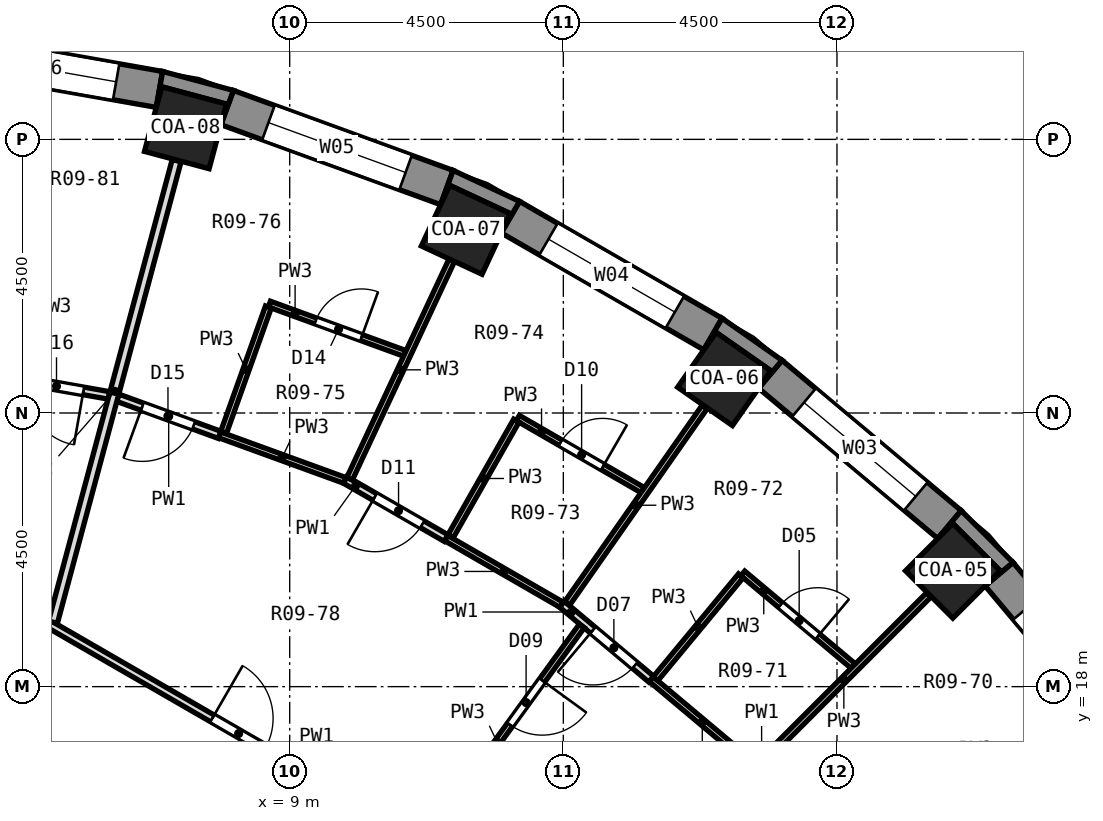
"""IFC4 building model, lengths in metres.
Left out: names, types, materials, properties, quantities, classifications, styles, units other than length and angle.
Written with IfcOpenShell. Run it as: python <this file> out.ifc"""

import sys

from ifc_helpers import new_model, si_unit, direction, frame, frame_2d, origin, origin_2d, place, context, subcontext, project, spatial, polyline, rectangle, outline, extrude, element, fill, save


model = new_model("IFC4")
c1 = context("Model", 3, precision=1e-05, world=origin(), true_north=direction((0.0, 1.0)))
c2 = subcontext(c1, "Body", "Model", "MODEL_VIEW")
j1 = project(units=[si_unit("LENGTHUNIT", "METRE"), si_unit("PLANEANGLEUNIT", "RADIAN")], contexts=[c1])
p1 = place(None, origin())
s1 = spatial("IfcSite", under=j1, at=p1, CompositionType="ELEMENT")
p2 = place(p1, origin())
s2 = spatial("IfcBuilding", under=s1, at=p2, CompositionType="ELEMENT")
p3 = place(p2, frame((0.0, 0.0, 26.3)))
s3 = spatial("IfcBuildingStorey", under=s2, at=p3, CompositionType="ELEMENT", Elevation=26.3)
p4 = place(p3, frame((19.905, 19.905, 0.0), z_axis=(0.0, 0.0, 1.0), x_axis=(0.707106781187, 0.707106781187, 0.0)))
e1 = element("IfcColumn", 1, at=p4, inside=s3, PredefinedType="COLUMN", context=c2, shape_type="SweptSolid", body=[
    extrude(rectangle(XDim=1.1, YDim=1.1, at=origin_2d()), origin(), (0.0, 0.0, 1.0), 3.3),
])
p5 = place(p3, frame((16.146, 23.059, -0.55), z_axis=(0.0, 0.0, 1.0), x_axis=(0.573576436351, 0.819152044289, 0.0)))
e2 = element("IfcColumn", 2, at=p5, inside=s3, PredefinedType="COLUMN", context=c2, shape_type="SweptSolid", body=[
    extrude(rectangle(XDim=1.1, YDim=1.1, at=origin_2d()), origin(), (0.0, 0.0, 1.0), 3.85),
])
p6 = place(p3, frame((11.897, 25.512, 0.0), z_axis=(0.0, 0.0, 1.0), x_axis=(0.422618261741, 0.906307787037, 0.0)))
e3 = element("IfcColumn", 3, at=p6, inside=s3, PredefinedType="COLUMN", context=c2, shape_type="SweptSolid", body=[
    extrude(rectangle(XDim=1.1, YDim=1.1, at=origin_2d()), origin(), (0.0, 0.0, 1.0), 3.3),
])
p7 = place(p3, frame((7.286, 27.191, -1.05), z_axis=(0.0, 0.0, 1.0), x_axis=(0.258819045103, 0.965925826289, 0.0)))
e4 = element("IfcColumn", 4, at=p7, inside=s3, PredefinedType="COLUMN", context=c2, shape_type="SweptSolid", body=[
    extrude(rectangle(XDim=1.1, YDim=1.1, at=origin_2d()), origin(), (0.0, 0.0, 1.0), 4.35),
])
p8 = place(p3, frame((23.137, 16.904, 0.0), z_axis=(0.0, 0.0, 1.0), x_axis=(-0.642809392687, 0.766026164483, 0.0)))
e5 = element("IfcWall", 5, at=p8, inside=s3, PredefinedType="SOLIDWALL", context=c2, shape_type="SweptSolid", body=[
    extrude(rectangle(XDim=3.846, YDim=0.6, at=frame_2d((1.923, 0.0))), origin(), (0.0, 0.0, 1.0), 2.75),
])
p9 = place(p8, frame((0.723, 0.0, 0.9)))
e6 = element("IfcOpeningElement", 6, at=p9, cuts=e5, PredefinedType="OPENING", context=c2, shape_type="SweptSolid", body=[
    extrude(rectangle(XDim=2.4, YDim=1.8, at=frame_2d((1.2, 0.9))), frame((0.0, 0.312, 0.0), z_axis=(0.0, -1.0, 0.0), x_axis=(1.0, 0.0, 0.0)), (0.0, 0.0, 1.0), 0.624),
])
p10 = place(p3, frame((19.85, 20.665, 0.0), z_axis=(0.0, 0.0, 1.0), x_axis=(-0.766026164483, 0.642809392687, 0.0)))
e7 = element("IfcWall", 7, at=p10, inside=s3, PredefinedType="SOLIDWALL", context=c2, shape_type="SweptSolid", body=[
    extrude(rectangle(XDim=3.846, YDim=0.6, at=frame_2d((1.923, 0.0))), origin(), (0.0, 0.0, 1.0), 2.75),
])
p11 = place(p10, frame((0.723, 0.0, 0.9)))
e8 = element("IfcOpeningElement", 8, at=p11, cuts=e7, PredefinedType="OPENING", context=c2, shape_type="SweptSolid", body=[
    extrude(rectangle(XDim=2.4, YDim=1.8, at=frame_2d((1.2, 0.9))), frame((0.0, 0.312, 0.0), z_axis=(0.0, -1.0, 0.0), x_axis=(1.0, 0.0, 0.0)), (0.0, 0.0, 1.0), 0.624),
])
p12 = place(p3, frame((15.96, 23.798, 0.0), z_axis=(0.0, 0.0, 1.0), x_axis=(-0.86603124159, 0.499989888488, 0.0)))
e9 = element("IfcWall", 9, at=p12, inside=s3, PredefinedType="SOLIDWALL", context=c2, shape_type="SweptSolid", body=[
    extrude(rectangle(XDim=3.846, YDim=0.6, at=frame_2d((1.923, 0.0))), origin(), (0.0, 0.0, 1.0), 2.75),
])
p13 = place(p12, frame((0.723, 0.0, 0.9)))
e10 = element("IfcOpeningElement", 10, at=p13, cuts=e9, PredefinedType="OPENING", context=c2, shape_type="SweptSolid", body=[
    extrude(rectangle(XDim=2.4, YDim=1.8, at=frame_2d((1.2, 0.9))), frame((0.0, 0.312, 0.0), z_axis=(0.0, -1.0, 0.0), x_axis=(1.0, 0.0, 0.0)), (0.0, 0.0, 1.0), 0.624),
])
p14 = place(p3, frame((11.585, 26.208, 0.0), z_axis=(0.0, 0.0, 1.0), x_axis=(-0.939689588564, 0.342028474173, 0.0)))
e11 = element("IfcWall", 11, at=p14, inside=s3, PredefinedType="SOLIDWALL", context=c2, shape_type="SweptSolid", body=[
    extrude(rectangle(XDim=3.846, YDim=0.6, at=frame_2d((1.923, 0.0))), origin(), (0.0, 0.0, 1.0), 2.75),
])
p15 = place(p14, frame((0.723, 0.0, 0.9)))
e12 = element("IfcOpeningElement", 12, at=p15, cuts=e11, PredefinedType="OPENING", context=c2, shape_type="SweptSolid", body=[
    extrude(rectangle(XDim=2.4, YDim=1.8, at=frame_2d((1.2, 0.9))), frame((0.0, 0.312, 0.0), z_axis=(0.0, -1.0, 0.0), x_axis=(1.0, 0.0, 0.0)), (0.0, 0.0, 1.0), 0.624),
])
p16 = place(p3, frame((6.858, 27.821, 0.0), z_axis=(0.0, 0.0, 1.0), x_axis=(-0.984800809218, 0.173687553279, 0.0)))
e13 = element("IfcWall", 13, at=p16, inside=s3, PredefinedType="SOLIDWALL", context=c2, shape_type="SweptSolid", body=[
    extrude(rectangle(XDim=3.846, YDim=0.6, at=frame_2d((1.923, 0.0))), origin(), (0.0, 0.0, 1.0), 2.75),
])
p17 = place(p16, frame((0.723, 0.0, 0.9)))
e14 = element("IfcOpeningElement", 14, at=p17, cuts=e13, PredefinedType="OPENING", context=c2, shape_type="SweptSolid", body=[
    extrude(rectangle(XDim=2.4, YDim=1.8, at=frame_2d((1.2, 0.9))), frame((0.0, 0.312, 0.0), z_axis=(0.0, -1.0, 0.0), x_axis=(1.0, 0.0, 0.0)), (0.0, 0.0, 1.0), 0.624),
])
p18 = place(p3, origin())
e15 = element("IfcWall", 15, at=p18, inside=s3, PredefinedType="SOLIDWALL", context=c2, shape_type="SweptSolid", body=[
    extrude(outline(polyline([(20.043, 20.895), (19.657, 20.435), (19.905, 20.683), (20.683, 19.905), (20.435, 19.657), (20.895, 20.043), (20.043, 20.895)])), origin(), (0.0, 0.0, 1.0), 2.75),
])
p19 = place(p3, origin())
e16 = element("IfcWall", 16, at=p19, inside=s3, PredefinedType="SOLIDWALL", context=c2, shape_type="SweptSolid", body=[
    extrude(outline(polyline([(17.097, 23.367), (16.11, 24.058), (15.81, 23.538), (16.011, 23.825), (16.912, 23.194), (16.711, 22.907), (17.097, 23.367)])), origin(), (0.0, 0.0, 1.0), 2.75),
])
p20 = place(p3, origin())
e17 = element("IfcWall", 17, at=p20, inside=s3, PredefinedType="SOLIDWALL", context=c2, shape_type="SweptSolid", body=[
    extrude(outline(polyline([(11.688, 26.49), (11.483, 25.926), (11.631, 26.243), (12.628, 25.779), (12.479, 25.461), (12.78, 25.981), (11.688, 26.49)])), origin(), (0.0, 0.0, 1.0), 2.75),
])
p21 = place(p3, origin())
e18 = element("IfcWall", 18, at=p21, inside=s3, PredefinedType="SOLIDWALL", context=c2, shape_type="SweptSolid", body=[
    extrude(outline(polyline([(6.91, 28.117), (6.806, 27.526), (6.897, 27.865), (7.959, 27.58), (7.869, 27.241), (8.074, 27.805), (6.91, 28.117)])), origin(), (0.0, 0.0, 1.0), 2.75),
])
p22 = place(p3, frame((14.946, 18.123, 0.0), z_axis=(0.0, 0.0, 1.0), x_axis=(0.765889072534, -0.642972727705, 0.0)))
e19 = element("IfcWall", 19, at=p22, inside=s3, PredefinedType="PARTITIONING", context=c2, shape_type="SweptSolid", body=[
    extrude(rectangle(XDim=2.193, YDim=0.1, at=frame_2d((1.096, 0.0))), origin(), (0.0, 0.0, 1.0), 2.75),
])
p23 = place(p3, frame((13.476, 19.356, 0.0), z_axis=(0.0, 0.0, 1.0), x_axis=(0.76614099915, -0.642672521135, 0.0)))
e20 = element("IfcWall", 20, at=p23, inside=s3, PredefinedType="PARTITIONING", context=c2, shape_type="SweptSolid", body=[
    extrude(rectangle(XDim=1.918, YDim=0.125, at=frame_2d((0.959, 0.0))), origin(), (0.0, 0.0, 1.0), 2.75),
])
p24 = place(p23, frame((0.666, 0.0, 0.0)))
e21 = element("IfcOpeningElement", 21, at=p24, cuts=e20, PredefinedType="OPENING", context=c2, shape_type="SweptSolid", body=[
    extrude(rectangle(XDim=0.9, YDim=2.1, at=frame_2d((0.45, 1.05))), frame((0.0, 0.074, 0.0), z_axis=(0.0, -1.0, 0.0), x_axis=(1.0, 0.0, 0.0)), (0.0, 0.0, 1.0), 0.149),
])
p25 = place(p3, frame((16.451, 19.862, 0.0), z_axis=(0.0, 0.0, 1.0), x_axis=(0.766132669123, -0.642682451373, 0.0)))
e22 = element("IfcWall", 22, at=p25, inside=s3, PredefinedType="PARTITIONING", context=c2, shape_type="SweptSolid", body=[
    extrude(rectangle(XDim=2.371, YDim=0.1, at=frame_2d((1.186, 0.0))), origin(), (0.0, 0.0, 1.0), 2.75),
])
p26 = place(p25, frame((0.811, 0.0, 0.0)))
e23 = element("IfcOpeningElement", 23, at=p26, cuts=e22, PredefinedType="OPENING", context=c2, shape_type="SweptSolid", body=[
    extrude(rectangle(XDim=0.8, YDim=2.1, at=frame_2d((0.4, 1.05))), frame((0.0, 0.062, 0.0), z_axis=(0.0, -1.0, 0.0), x_axis=(1.0, 0.0, 0.0)), (0.0, 0.0, 1.0), 0.124),
])
p27 = place(p3, frame((5.029, 19.036, 0.0), z_axis=(0.0, 0.0, 1.0), x_axis=(0.866024825845, -0.50000100102, 0.0)))
e24 = element("IfcWall", 24, at=p27, inside=s3, PredefinedType="PARTITIONING", context=c2, shape_type="SweptSolid", body=[
    extrude(rectangle(XDim=10.192, YDim=0.125, at=frame_2d((5.096, 0.0))), origin(), (0.0, 0.0, 1.0), 2.75),
])
p28 = place(p27, frame((3.116, 0.0, 0.0)))
e25 = element("IfcOpeningElement", 25, at=p28, cuts=e24, PredefinedType="OPENING", context=c2, shape_type="SweptSolid", body=[
    extrude(rectangle(XDim=1.0, YDim=2.1, at=frame_2d((0.5, 1.05))), frame((0.0, 0.074, 0.0), z_axis=(0.0, -1.0, 0.0), x_axis=(1.0, 0.0, 0.0)), (0.0, 0.0, 1.0), 0.149),
])
p29 = place(p3, frame((11.572, 20.443, 0.0), z_axis=(0.0, 0.0, 1.0), x_axis=(0.865939000713, -0.500149624657, 0.0)))
e26 = element("IfcWall", 26, at=p29, inside=s3, PredefinedType="PARTITIONING", context=c2, shape_type="SweptSolid", body=[
    extrude(rectangle(XDim=2.193, YDim=0.1, at=frame_2d((1.097, 0.0))), origin(), (0.0, 0.0, 1.0), 2.75),
])
p30 = place(p3, frame((9.91, 21.402, 0.0), z_axis=(0.0, 0.0, 1.0), x_axis=(0.866191941426, -0.499711437341, 0.0)))
e27 = element("IfcWall", 27, at=p30, inside=s3, PredefinedType="PARTITIONING", context=c2, shape_type="SweptSolid", body=[
    extrude(rectangle(XDim=1.919, YDim=0.125, at=frame_2d((0.959, 0.0))), origin(), (0.0, 0.0, 1.0), 2.75),
])
p31 = place(p30, frame((0.566, 0.0, 0.0)))
e28 = element("IfcOpeningElement", 28, at=p31, cuts=e27, PredefinedType="OPENING", context=c2, shape_type="SweptSolid", body=[
    extrude(rectangle(XDim=0.9, YDim=2.1, at=frame_2d((0.45, 1.05))), frame((0.0, 0.074, 0.0), z_axis=(0.0, -1.0, 0.0), x_axis=(1.0, 0.0, 0.0)), (0.0, 0.0, 1.0), 0.149),
])
p32 = place(p3, frame((12.752, 22.417, 0.0), z_axis=(0.0, 0.0, 1.0), x_axis=(0.865984969814, -0.500070027153, 0.0)))
e29 = element("IfcWall", 29, at=p32, inside=s3, PredefinedType="PARTITIONING", context=c2, shape_type="SweptSolid", body=[
    extrude(rectangle(XDim=2.371, YDim=0.1, at=frame_2d((1.186, 0.0))), origin(), (0.0, 0.0, 1.0), 2.75),
])
p33 = place(p32, frame((0.811, 0.0, 0.0)))
e30 = element("IfcOpeningElement", 30, at=p33, cuts=e29, PredefinedType="OPENING", context=c2, shape_type="SweptSolid", body=[
    extrude(rectangle(XDim=0.8, YDim=2.1, at=frame_2d((0.4, 1.05))), frame((0.0, 0.062, 0.0), z_axis=(0.0, -1.0, 0.0), x_axis=(1.0, 0.0, 0.0)), (0.0, 0.0, 1.0), 0.124),
])
p34 = place(p3, frame((7.846, 22.141, 0.0), z_axis=(0.0, 0.0, 1.0), x_axis=(0.939712116987, -0.341966573204, 0.0)))
e31 = element("IfcWall", 31, at=p34, inside=s3, PredefinedType="PARTITIONING", context=c2, shape_type="SweptSolid", body=[
    extrude(rectangle(XDim=2.192, YDim=0.1, at=frame_2d((1.096, 0.0))), origin(), (0.0, 0.0, 1.0), 2.75),
])
p35 = place(p3, frame((6.174, 22.75, 0.0), z_axis=(0.0, 0.0, 1.0), x_axis=(0.939613069721, -0.342238629044, 0.0)))
e32 = element("IfcWall", 32, at=p35, inside=s3, PredefinedType="PARTITIONING", context=c2, shape_type="SweptSolid", body=[
    extrude(rectangle(XDim=1.78, YDim=0.125, at=frame_2d((0.89, 0.0))), origin(), (0.0, 0.0, 1.0), 2.75),
])
p36 = place(p35, frame((0.427, 0.0, 0.0)))
e33 = element("IfcOpeningElement", 33, at=p36, cuts=e32, PredefinedType="OPENING", context=c2, shape_type="SweptSolid", body=[
    extrude(rectangle(XDim=0.9, YDim=2.1, at=frame_2d((0.45, 1.05))), frame((0.0, 0.074, 0.0), z_axis=(0.0, -1.0, 0.0), x_axis=(1.0, 0.0, 0.0)), (0.0, 0.0, 1.0), 0.149),
])
p37 = place(p3, frame((8.666, 24.291, 0.0), z_axis=(0.0, 0.0, 1.0), x_axis=(0.939700179596, -0.341999374952, 0.0)))
e34 = element("IfcWall", 34, at=p37, inside=s3, PredefinedType="PARTITIONING", context=c2, shape_type="SweptSolid", body=[
    extrude(rectangle(XDim=2.371, YDim=0.1, at=frame_2d((1.186, 0.0))), origin(), (0.0, 0.0, 1.0), 2.75),
])
p38 = place(p37, frame((0.811, 0.0, 0.0)))
e35 = element("IfcOpeningElement", 35, at=p38, cuts=e34, PredefinedType="OPENING", context=c2, shape_type="SweptSolid", body=[
    extrude(rectangle(XDim=0.8, YDim=2.1, at=frame_2d((0.4, 1.05))), frame((0.0, 0.062, 0.0), z_axis=(0.0, -1.0, 0.0), x_axis=(1.0, 0.0, 0.0)), (0.0, 0.0, 1.0), 0.124),
])
p39 = place(p3, frame((4.276, 23.098, 0.0), z_axis=(0.0, 0.0, 1.0), x_axis=(0.984784939559, -0.173777509529, 0.0)))
e36 = element("IfcWall", 36, at=p39, inside=s3, PredefinedType="PARTITIONING", context=c2, shape_type="SweptSolid", body=[
    extrude(rectangle(XDim=1.78, YDim=0.125, at=frame_2d((0.89, 0.0))), origin(), (0.0, 0.0, 1.0), 2.75),
])
p40 = place(p39, frame((0.452, 0.0, 0.0)))
e37 = element("IfcOpeningElement", 37, at=p40, cuts=e36, PredefinedType="OPENING", context=c2, shape_type="SweptSolid", body=[
    extrude(rectangle(XDim=0.9, YDim=2.1, at=frame_2d((0.45, 1.05))), frame((0.0, 0.074, 0.0), z_axis=(0.0, -1.0, 0.0), x_axis=(1.0, 0.0, 0.0)), (0.0, 0.0, 1.0), 0.149),
])
p41 = place(p3, frame((16.717, 16.717, 0.0), z_axis=(0.0, 0.0, 1.0), x_axis=(0.707106781187, 0.707106781187, 0.0)))
e38 = element("IfcWall", 38, at=p41, inside=s3, PredefinedType="PARTITIONING", context=c2, shape_type="SweptSolid", body=[
    extrude(rectangle(XDim=3.948, YDim=0.1, at=frame_2d((1.974, 0.0))), origin(), (0.0, 0.0, 1.0), 2.75),
])
p42 = place(p3, frame((15.016, 18.129, 0.0), z_axis=(0.0, 0.0, 1.0), x_axis=(0.63792197303, 0.770101003976, 0.0)))
e39 = element("IfcWall", 39, at=p42, inside=s3, PredefinedType="PARTITIONING", context=c2, shape_type="SweptSolid", body=[
    extrude(rectangle(XDim=2.2, YDim=0.1, at=frame_2d((1.1, 0.0))), origin(), (0.0, 0.0, 1.0), 2.75),
])
p43 = place(p3, frame((11.266, 15.507, 0.0), z_axis=(0.0, 0.0, 1.0), x_axis=(0.587926223092, 0.808914554326, 0.0)))
e40 = element("IfcWall", 40, at=p43, inside=s3, PredefinedType="PARTITIONING", context=c2, shape_type="SweptSolid", body=[
    extrude(rectangle(XDim=4.317, YDim=0.1, at=frame_2d((2.159, 0.0))), origin(), (0.0, 0.0, 1.0), 2.75),
])
p44 = place(p43, frame((2.309, 0.0, 0.0)))
e41 = element("IfcOpeningElement", 41, at=p44, cuts=e40, PredefinedType="OPENING", context=c2, shape_type="SweptSolid", body=[
    extrude(rectangle(XDim=0.9, YDim=2.1, at=frame_2d((0.45, 1.05))), frame((0.0, 0.062, 0.0), z_axis=(0.0, -1.0, 0.0), x_axis=(1.0, 0.0, 0.0)), (0.0, 0.0, 1.0), 0.124),
])
p45 = place(p3, frame((13.561, 19.366, 0.0), z_axis=(0.0, 0.0, 1.0), x_axis=(0.573366885016, 0.819298733776, 0.0)))
e42 = element("IfcWall", 42, at=p45, inside=s3, PredefinedType="PARTITIONING", context=c2, shape_type="SweptSolid", body=[
    extrude(rectangle(XDim=3.948, YDim=0.1, at=frame_2d((1.974, 0.0))), origin(), (0.0, 0.0, 1.0), 2.75),
])
p46 = place(p3, frame((11.646, 20.472, 0.0), z_axis=(0.0, 0.0, 1.0), x_axis=(0.494394843989, 0.869237446408, 0.0)))
e43 = element("IfcWall", 43, at=p46, inside=s3, PredefinedType="PARTITIONING", context=c2, shape_type="SweptSolid", body=[
    extrude(rectangle(XDim=2.187, YDim=0.1, at=frame_2d((1.094, 0.0))), origin(), (0.0, 0.0, 1.0), 2.75),
])
p47 = place(p3, frame((9.984, 21.416, 0.0), z_axis=(0.0, 0.0, 1.0), x_axis=(0.423587219874, 0.905855323525, 0.0)))
e44 = element("IfcWall", 44, at=p47, inside=s3, PredefinedType="PARTITIONING", context=c2, shape_type="SweptSolid", body=[
    extrude(rectangle(XDim=3.961, YDim=0.1, at=frame_2d((1.98, 0.0))), origin(), (0.0, 0.0, 1.0), 2.75),
])
p48 = place(p3, frame((7.914, 22.183, 0.0), z_axis=(0.0, 0.0, 1.0), x_axis=(0.335940567571, 0.941883185464, 0.0)))
e45 = element("IfcWall", 45, at=p48, inside=s3, PredefinedType="PARTITIONING", context=c2, shape_type="SweptSolid", body=[
    extrude(rectangle(XDim=2.188, YDim=0.1, at=frame_2d((1.094, 0.0))), origin(), (0.0, 0.0, 1.0), 2.75),
])
p49 = place(p3, frame((5.107, 19.06, 0.0), z_axis=(0.0, 0.0, 1.0), x_axis=(0.258797692258, 0.965931547513, 0.0)))
e46 = element("IfcWall", 46, at=p49, inside=s3, PredefinedType="PARTITIONING", context=c2, shape_type="SweptSolid", body=[
    extrude(rectangle(XDim=7.857, YDim=0.15, at=frame_2d((3.929, 0.0))), origin(), (0.0, 0.0, 1.0), 2.75),
])
p50 = place(p9, origin())
e47 = element("IfcWindow", 47, at=p50, inside=s3, PartitioningType="SINGLE_PANEL", PredefinedType="WINDOW", context=c2, shape_type="SweptSolid", body=[
    extrude(rectangle(XDim=2.4, YDim=1.8, at=frame_2d((1.2, 0.9))), frame((0.0, 0.18, 0.0), z_axis=(0.0, -1.0, 0.0), x_axis=(1.0, 0.0, 0.0)), (0.0, 0.0, 1.0), 0.06),
])
fill(e6, e47)
p51 = place(p11, origin())
e48 = element("IfcWindow", 48, at=p51, inside=s3, PartitioningType="SINGLE_PANEL", PredefinedType="WINDOW", context=c2, shape_type="SweptSolid", body=[
    extrude(rectangle(XDim=2.4, YDim=1.8, at=frame_2d((1.2, 0.9))), frame((0.0, 0.18, 0.0), z_axis=(0.0, -1.0, 0.0), x_axis=(1.0, 0.0, 0.0)), (0.0, 0.0, 1.0), 0.06),
])
fill(e8, e48)
p52 = place(p13, origin())
e49 = element("IfcWindow", 49, at=p52, inside=s3, PartitioningType="SINGLE_PANEL", PredefinedType="WINDOW", context=c2, shape_type="SweptSolid", body=[
    extrude(rectangle(XDim=2.4, YDim=1.8, at=frame_2d((1.2, 0.9))), frame((0.0, 0.18, 0.0), z_axis=(0.0, -1.0, 0.0), x_axis=(1.0, 0.0, 0.0)), (0.0, 0.0, 1.0), 0.06),
])
fill(e10, e49)
p53 = place(p15, origin())
e50 = element("IfcWindow", 50, at=p53, inside=s3, PartitioningType="SINGLE_PANEL", PredefinedType="WINDOW", context=c2, shape_type="SweptSolid", body=[
    extrude(rectangle(XDim=2.4, YDim=1.8, at=frame_2d((1.2, 0.9))), frame((0.0, 0.18, 0.0), z_axis=(0.0, -1.0, 0.0), x_axis=(1.0, 0.0, 0.0)), (0.0, 0.0, 1.0), 0.06),
])
fill(e12, e50)
p54 = place(p17, origin())
e51 = element("IfcWindow", 51, at=p54, inside=s3, PartitioningType="SINGLE_PANEL", PredefinedType="WINDOW", context=c2, shape_type="SweptSolid", body=[
    extrude(rectangle(XDim=2.4, YDim=1.8, at=frame_2d((1.2, 0.9))), frame((0.0, 0.18, 0.0), z_axis=(0.0, -1.0, 0.0), x_axis=(1.0, 0.0, 0.0)), (0.0, 0.0, 1.0), 0.06),
])
fill(e14, e51)
p55 = place(p26, origin())
e52 = element("IfcDoor", 52, at=p55, inside=s3, OperationType="SINGLE_SWING_RIGHT", PredefinedType="DOOR", context=c2, shape_type="SweptSolid", body=[
    extrude(rectangle(XDim=0.8, YDim=2.1, at=frame_2d((0.4, 1.05))), frame((0.0, 0.025, 0.0), z_axis=(0.0, -1.0, 0.0), x_axis=(1.0, 0.0, 0.0)), (0.0, 0.0, 1.0), 0.05),
])
fill(e23, e52)
p56 = place(p24, frame((0.9, 0.0, 0.0), z_axis=(0.0, 0.0, 1.0), x_axis=(-1.0, 0.0, 0.0)))
e53 = element("IfcDoor", 53, at=p56, inside=s3, OperationType="SINGLE_SWING_RIGHT", PredefinedType="DOOR", context=c2, shape_type="SweptSolid", body=[
    extrude(rectangle(XDim=0.9, YDim=2.1, at=frame_2d((0.45, 1.05))), frame((0.0, 0.025, 0.0), z_axis=(0.0, -1.0, 0.0), x_axis=(1.0, 0.0, 0.0)), (0.0, 0.0, 1.0), 0.05),
])
fill(e21, e53)
p57 = place(p44, frame((0.9, 0.0, 0.0), z_axis=(0.0, 0.0, 1.0), x_axis=(-1.0, 0.0, 0.0)))
e54 = element("IfcDoor", 54, at=p57, inside=s3, OperationType="SINGLE_SWING_LEFT", PredefinedType="DOOR", context=c2, shape_type="SweptSolid", body=[
    extrude(rectangle(XDim=0.9, YDim=2.1, at=frame_2d((0.45, 1.05))), frame((0.0, 0.025, 0.0), z_axis=(0.0, -1.0, 0.0), x_axis=(1.0, 0.0, 0.0)), (0.0, 0.0, 1.0), 0.05),
])
fill(e41, e54)
p58 = place(p33, origin())
e55 = element("IfcDoor", 55, at=p58, inside=s3, OperationType="SINGLE_SWING_RIGHT", PredefinedType="DOOR", context=c2, shape_type="SweptSolid", body=[
    extrude(rectangle(XDim=0.8, YDim=2.1, at=frame_2d((0.4, 1.05))), frame((0.0, 0.025, 0.0), z_axis=(0.0, -1.0, 0.0), x_axis=(1.0, 0.0, 0.0)), (0.0, 0.0, 1.0), 0.05),
])
fill(e30, e55)
p59 = place(p31, frame((0.9, 0.0, 0.0), z_axis=(0.0, 0.0, 1.0), x_axis=(-1.0, 0.0, 0.0)))
e56 = element("IfcDoor", 56, at=p59, inside=s3, OperationType="SINGLE_SWING_RIGHT", PredefinedType="DOOR", context=c2, shape_type="SweptSolid", body=[
    extrude(rectangle(XDim=0.9, YDim=2.1, at=frame_2d((0.45, 1.05))), frame((0.0, 0.025, 0.0), z_axis=(0.0, -1.0, 0.0), x_axis=(1.0, 0.0, 0.0)), (0.0, 0.0, 1.0), 0.05),
])
fill(e28, e56)
p60 = place(p28, origin())
e57 = element("IfcDoor", 57, at=p60, inside=s3, OperationType="SINGLE_SWING_LEFT", PredefinedType="DOOR", context=c2, shape_type="SweptSolid", body=[
    extrude(rectangle(XDim=1.0, YDim=2.1, at=frame_2d((0.5, 1.05))), frame((0.0, 0.025, 0.0), z_axis=(0.0, -1.0, 0.0), x_axis=(1.0, 0.0, 0.0)), (0.0, 0.0, 1.0), 0.05),
])
fill(e25, e57)
p61 = place(p38, origin())
e58 = element("IfcDoor", 58, at=p61, inside=s3, OperationType="SINGLE_SWING_RIGHT", PredefinedType="DOOR", context=c2, shape_type="SweptSolid", body=[
    extrude(rectangle(XDim=0.8, YDim=2.1, at=frame_2d((0.4, 1.05))), frame((0.0, 0.025, 0.0), z_axis=(0.0, -1.0, 0.0), x_axis=(1.0, 0.0, 0.0)), (0.0, 0.0, 1.0), 0.05),
])
fill(e35, e58)
p62 = place(p36, frame((0.9, 0.0, 0.0), z_axis=(0.0, 0.0, 1.0), x_axis=(-1.0, 0.0, 0.0)))
e59 = element("IfcDoor", 59, at=p62, inside=s3, OperationType="SINGLE_SWING_RIGHT", PredefinedType="DOOR", context=c2, shape_type="SweptSolid", body=[
    extrude(rectangle(XDim=0.9, YDim=2.1, at=frame_2d((0.45, 1.05))), frame((0.0, 0.025, 0.0), z_axis=(0.0, -1.0, 0.0), x_axis=(1.0, 0.0, 0.0)), (0.0, 0.0, 1.0), 0.05),
])
fill(e33, e59)
p63 = place(p40, frame((0.9, 0.0, 0.0), z_axis=(0.0, 0.0, 1.0), x_axis=(-1.0, 0.0, 0.0)))
e60 = element("IfcDoor", 60, at=p63, inside=s3, OperationType="SINGLE_SWING_LEFT", PredefinedType="DOOR", context=c2, shape_type="SweptSolid", body=[
    extrude(rectangle(XDim=0.9, YDim=2.1, at=frame_2d((0.45, 1.05))), frame((0.0, 0.025, 0.0), z_axis=(0.0, -1.0, 0.0), x_axis=(1.0, 0.0, 0.0)), (0.0, 0.0, 1.0), 0.05),
])
fill(e37, e60)
save(model, sys.argv[1])
